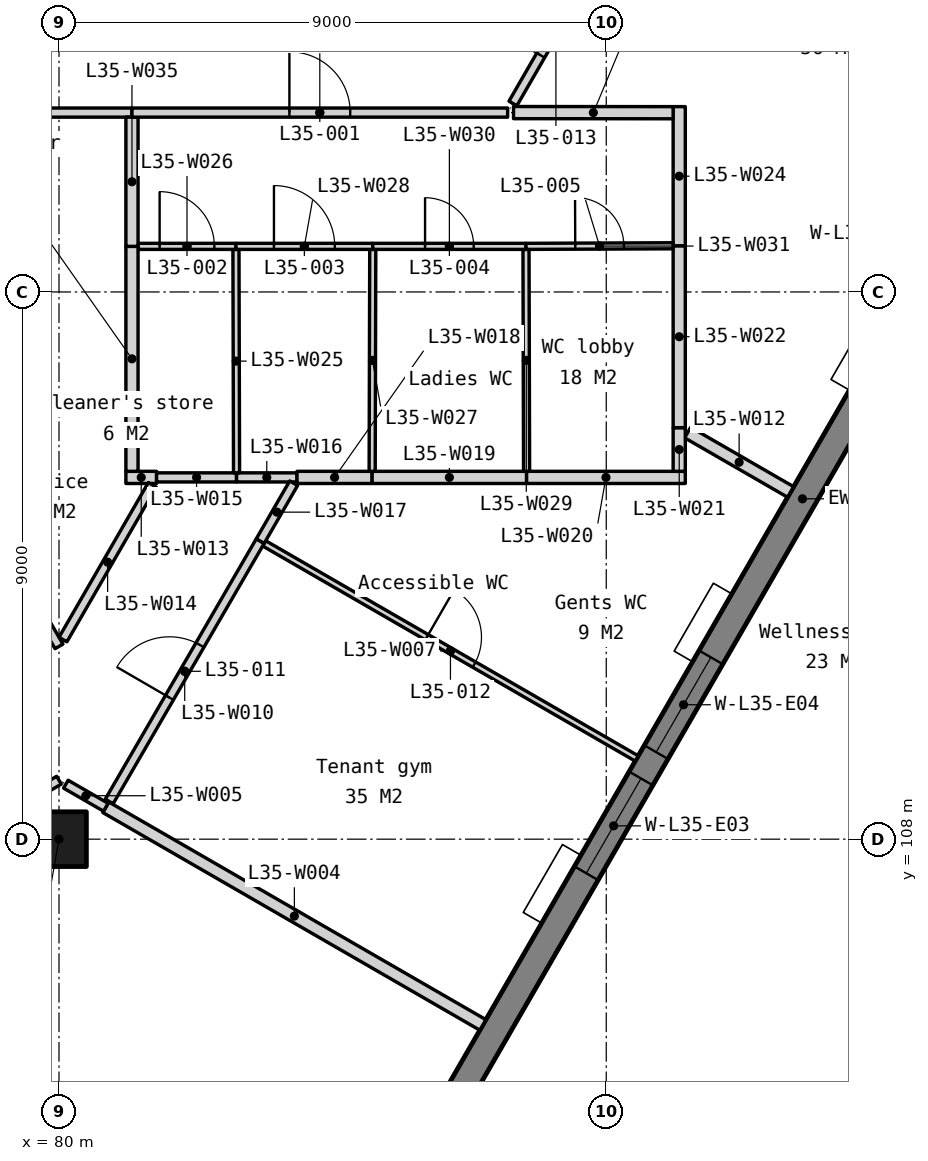
"""IFC4 building model, lengths in metres.
Left out: names, types, materials, properties, quantities, classifications, styles, units other than length and angle.
Written with IfcOpenShell. Run it as: python <this file> out.ifc"""

import sys

from ifc_helpers import new_model, si_unit, direction, frame, frame_2d, origin, origin_2d, place, context, subcontext, project, spatial, polyline, rectangle, outline, extrude, element, fill, save


model = new_model("IFC4")
c1 = context("Model", 3, precision=1e-05, world=origin(), true_north=direction((0.0, 1.0)))
c2 = subcontext(c1, "Body", "Model", "MODEL_VIEW")
j1 = project(units=[si_unit("LENGTHUNIT", "METRE"), si_unit("PLANEANGLEUNIT", "RADIAN")], contexts=[c1])
p1 = place(None, origin())
s1 = spatial("IfcSite", under=j1, at=p1, CompositionType="ELEMENT")
p2 = place(p1, origin())
s2 = spatial("IfcBuilding", under=s1, at=p2, CompositionType="ELEMENT")
p3 = place(p2, frame((0.0, 0.0, 140.3)))
s3 = spatial("IfcBuildingStorey", under=s2, at=p3, CompositionType="ELEMENT", Elevation=140.3)
p4 = place(p3, frame((80.0, 108.0, 0.0), z_axis=(0.0, 0.0, 1.0), x_axis=(1.0, 0.0, 0.0)))
e1 = element("IfcColumn", 1, at=p4, inside=s3, PredefinedType="COLUMN", context=c2, shape_type="SweptSolid", body=[
    extrude(rectangle(XDim=0.9, YDim=0.9, at=origin_2d()), origin(), (0.0, 0.0, 1.0), 3.9),
])
p5 = place(p3, frame((82.105, 96.067, -0.15), z_axis=(0.0, 0.0, 1.0), x_axis=(0.499997369791, 0.866026922331, 0.0)))
e2 = element("IfcWall", 2, at=p5, inside=s3, PredefinedType="SOLIDWALL", context=c2, shape_type="SweptSolid", body=[
    extrude(outline(polyline([(40.486, 0.0), (40.486, 3.9), (0.0, 3.9), (0.0, 0.0), (40.486, 0.0)])), frame((0.0, 0.225, 0.0), z_axis=(0.0, -1.0, 0.0), x_axis=(1.0, 0.0, 0.0)), (0.0, 0.0, 1.0), 0.45),
])
p6 = place(p5, frame((3.011, 0.0, 0.95)))
e3 = element("IfcOpeningElement", 3, at=p6, cuts=e2, PredefinedType="OPENING", context=c2, shape_type="SweptSolid", body=[
    extrude(rectangle(XDim=1.8, YDim=2.2, at=frame_2d((0.9, 1.1))), frame((0.0, 0.235, 0.0), z_axis=(0.0, -1.0, 0.0), x_axis=(1.0, 0.0, 0.0)), (0.0, 0.0, 1.0), 0.47),
])
p7 = place(p5, frame((5.311, 0.0, 0.95)))
e4 = element("IfcOpeningElement", 4, at=p7, cuts=e2, PredefinedType="OPENING", context=c2, shape_type="SweptSolid", body=[
    extrude(rectangle(XDim=1.8, YDim=2.2, at=frame_2d((0.9, 1.1))), frame((0.0, 0.235, 0.0), z_axis=(0.0, -1.0, 0.0), x_axis=(1.0, 0.0, 0.0)), (0.0, 0.0, 1.0), 0.47),
])
p8 = place(p5, frame((13.132, 0.0, 0.95)))
e5 = element("IfcOpeningElement", 5, at=p8, cuts=e2, PredefinedType="OPENING", context=c2, shape_type="SweptSolid", body=[
    extrude(rectangle(XDim=1.8, YDim=2.2, at=frame_2d((0.9, 1.1))), frame((0.0, 0.235, 0.0), z_axis=(0.0, -1.0, 0.0), x_axis=(1.0, 0.0, 0.0)), (0.0, 0.0, 1.0), 0.47),
])
p9 = place(p5, frame((15.432, 0.0, 0.95)))
e6 = element("IfcOpeningElement", 6, at=p9, cuts=e2, PredefinedType="OPENING", context=c2, shape_type="SweptSolid", body=[
    extrude(rectangle(XDim=1.8, YDim=2.2, at=frame_2d((0.9, 1.1))), frame((0.0, 0.235, 0.0), z_axis=(0.0, -1.0, 0.0), x_axis=(1.0, 0.0, 0.0)), (0.0, 0.0, 1.0), 0.47),
])
p10 = place(p5, frame((23.254, 0.0, 0.95)))
e7 = element("IfcOpeningElement", 7, at=p10, cuts=e2, PredefinedType="OPENING", context=c2, shape_type="SweptSolid", body=[
    extrude(rectangle(XDim=1.8, YDim=2.2, at=frame_2d((0.9, 1.1))), frame((0.0, 0.235, 0.0), z_axis=(0.0, -1.0, 0.0), x_axis=(1.0, 0.0, 0.0)), (0.0, 0.0, 1.0), 0.47),
])
p11 = place(p5, frame((25.554, 0.0, 0.95)))
e8 = element("IfcOpeningElement", 8, at=p11, cuts=e2, PredefinedType="OPENING", context=c2, shape_type="SweptSolid", body=[
    extrude(rectangle(XDim=1.8, YDim=2.2, at=frame_2d((0.9, 1.1))), frame((0.0, 0.235, 0.0), z_axis=(0.0, -1.0, 0.0), x_axis=(1.0, 0.0, 0.0)), (0.0, 0.0, 1.0), 0.47),
])
p12 = place(p5, frame((33.375, 0.0, 0.95)))
e9 = element("IfcOpeningElement", 9, at=p12, cuts=e2, PredefinedType="OPENING", context=c2, shape_type="SweptSolid", body=[
    extrude(rectangle(XDim=1.8, YDim=2.2, at=frame_2d((0.9, 1.1))), frame((0.0, 0.235, 0.0), z_axis=(0.0, -1.0, 0.0), x_axis=(1.0, 0.0, 0.0)), (0.0, 0.0, 1.0), 0.47),
])
p13 = place(p5, frame((35.675, 0.0, 0.95)))
e10 = element("IfcOpeningElement", 10, at=p13, cuts=e2, PredefinedType="OPENING", context=c2, shape_type="SweptSolid", body=[
    extrude(rectangle(XDim=1.8, YDim=2.2, at=frame_2d((0.9, 1.1))), frame((0.0, 0.235, 0.0), z_axis=(0.0, -1.0, 0.0), x_axis=(1.0, 0.0, 0.0)), (0.0, 0.0, 1.0), 0.47),
])
p14 = place(p3, frame((79.23, 108.525, 0.0), z_axis=(0.0, 0.0, 1.0), x_axis=(0.865970738743, 0.500094670678, 0.0)))
e11 = element("IfcWall", 11, at=p14, inside=s3, PredefinedType="PARTITIONING", context=c2, shape_type="SweptSolid", body=[
    extrude(rectangle(XDim=0.889, YDim=0.15, at=frame_2d((0.445, 0.0))), origin(), (0.0, 0.0, 1.0), 3.75),
])
p15 = place(p3, frame((80.77, 108.525, 0.0), z_axis=(0.0, 0.0, 1.0), x_axis=(0.866033408367, -0.4999861354, 0.0)))
e12 = element("IfcWall", 12, at=p15, inside=s3, PredefinedType="PARTITIONING", context=c2, shape_type="SweptSolid", body=[
    extrude(rectangle(XDim=7.16, YDim=0.2, at=frame_2d((3.58, 0.0))), origin(), (0.0, 0.0, 1.0), 3.75),
])
p16 = place(p3, frame((80.113, 108.905, 0.0), z_axis=(0.0, 0.0, 1.0), x_axis=(0.865939322839, -0.50014906694, 0.0)))
e13 = element("IfcWall", 13, at=p16, inside=s3, PredefinedType="PARTITIONING", context=c2, shape_type="SweptSolid", body=[
    extrude(rectangle(XDim=0.76, YDim=0.15, at=frame_2d((0.38, 0.0))), origin(), (0.0, 0.0, 1.0), 3.75),
])
p17 = place(p3, frame((83.374, 112.865, 0.0), z_axis=(0.0, 0.0, 1.0), x_axis=(0.866021813296, -0.500006218857, 0.0)))
e14 = element("IfcWall", 14, at=p17, inside=s3, PredefinedType="PARTITIONING", context=c2, shape_type="SweptSolid", body=[
    extrude(rectangle(XDim=7.075, YDim=0.1, at=frame_2d((3.538, 0.0))), origin(), (0.0, 0.0, 1.0), 3.75),
])
p18 = place(p17, frame((3.087, 0.0, 0.0)))
e15 = element("IfcOpeningElement", 15, at=p18, cuts=e14, PredefinedType="OPENING", context=c2, shape_type="SweptSolid", body=[
    extrude(rectangle(XDim=0.9, YDim=2.1, at=frame_2d((0.45, 1.05))), frame((0.0, 0.06, 0.0), z_axis=(0.0, -1.0, 0.0), x_axis=(1.0, 0.0, 0.0)), (0.0, 0.0, 1.0), 0.12),
])
p19 = place(p3, frame((74.931, 119.95, 0.0), z_axis=(0.0, 0.0, 1.0), x_axis=(0.499998319705, -0.866026373901, 0.0)))
e16 = element("IfcWall", 16, at=p19, inside=s3, PredefinedType="PARTITIONING", context=c2, shape_type="SweptSolid", body=[
    extrude(rectangle(XDim=10.138, YDim=0.15, at=frame_2d((5.069, 0.0))), origin(), (0.0, 0.0, 1.0), 3.75),
])
p20 = place(p19, frame((4.169, 0.0, 0.0)))
e17 = element("IfcOpeningElement", 17, at=p20, cuts=e16, PredefinedType="OPENING", context=c2, shape_type="SweptSolid", body=[
    extrude(rectangle(XDim=1.8, YDim=2.1, at=frame_2d((0.9, 1.05))), frame((0.0, 0.085, 0.0), z_axis=(0.0, -1.0, 0.0), x_axis=(1.0, 0.0, 0.0)), (0.0, 0.0, 1.0), 0.17),
])
p21 = place(p3, frame((80.825, 108.62, 0.0), z_axis=(0.0, 0.0, 1.0), x_axis=(0.501704805906, 0.865038893768, 0.0)))
e18 = element("IfcWall", 18, at=p21, inside=s3, PredefinedType="PARTITIONING", context=c2, shape_type="SweptSolid", body=[
    extrude(rectangle(XDim=4.951, YDim=0.15, at=frame_2d((2.476, 0.0))), origin(), (0.0, 0.0, 1.0), 3.75),
])
p22 = place(p21, frame((1.975, 0.0, 0.0)))
e19 = element("IfcOpeningElement", 19, at=p22, cuts=e18, PredefinedType="OPENING", context=c2, shape_type="SweptSolid", body=[
    extrude(rectangle(XDim=1.0, YDim=2.1, at=frame_2d((0.5, 1.05))), frame((0.0, 0.085, 0.0), z_axis=(0.0, -1.0, 0.0), x_axis=(1.0, 0.0, 0.0)), (0.0, 0.0, 1.0), 0.17),
])
p23 = place(p3, frame((90.339, 114.688, 0.0), z_axis=(0.0, 0.0, 1.0), x_axis=(0.866021300503, -0.500007107024, 0.0)))
e20 = element("IfcWall", 20, at=p23, inside=s3, PredefinedType="PARTITIONING", context=c2, shape_type="SweptSolid", body=[
    extrude(rectangle(XDim=1.955, YDim=0.2, at=frame_2d((0.978, 0.0))), origin(), (0.0, 0.0, 1.0), 3.75),
])
p24 = place(p3, frame((81.1, 113.95, 0.0), z_axis=(0.0, 0.0, 1.0), x_axis=(1.0, 0.0, 0.0)))
e21 = element("IfcWall", 21, at=p24, inside=s3, PredefinedType="PARTITIONING", context=c2, shape_type="SweptSolid", body=[
    extrude(rectangle(XDim=0.505, YDim=0.2, at=frame_2d((0.252, 0.0))), origin(), (0.0, 0.0, 1.0), 3.75),
])
p25 = place(p3, frame((80.065, 111.283, 0.0), z_axis=(0.0, 0.0, 1.0), x_axis=(0.499962090823, 0.866047289552, 0.0)))
e22 = element("IfcWall", 22, at=p25, inside=s3, PredefinedType="PARTITIONING", context=c2, shape_type="SweptSolid", body=[
    extrude(rectangle(XDim=2.94, YDim=0.15, at=frame_2d((1.47, 0.0))), origin(), (0.0, 0.0, 1.0), 3.75),
])
p26 = place(p3, frame((81.605, 113.95, 0.0), z_axis=(0.0, 0.0, 1.0), x_axis=(1.0, 0.0, 0.0)))
e23 = element("IfcWall", 23, at=p26, inside=s3, PredefinedType="PARTITIONING", context=c2, shape_type="SweptSolid", body=[
    extrude(rectangle(XDim=1.315, YDim=0.15, at=frame_2d((0.658, 0.0))), origin(), (0.0, 0.0, 1.0), 3.75),
])
p27 = place(p3, frame((82.92, 113.95, 0.0), z_axis=(0.0, 0.0, 1.0), x_axis=(1.0, 0.0, 0.0)))
e24 = element("IfcWall", 24, at=p27, inside=s3, PredefinedType="PARTITIONING", context=c2, shape_type="SweptSolid", body=[
    extrude(rectangle(XDim=0.994, YDim=0.15, at=frame_2d((0.497, 0.0))), origin(), (0.0, 0.0, 1.0), 3.75),
])
p28 = place(p3, frame((83.309, 112.903, 0.0), z_axis=(0.0, 0.0, 1.0), x_axis=(0.500055614084, 0.865993292597, 0.0)))
e25 = element("IfcWall", 25, at=p28, inside=s3, PredefinedType="PARTITIONING", context=c2, shape_type="SweptSolid", body=[
    extrude(rectangle(XDim=1.099, YDim=0.15, at=frame_2d((0.55, 0.0))), origin(), (0.0, 0.0, 1.0), 3.75),
])
p29 = place(p3, frame((83.914, 113.95, 0.0), z_axis=(0.0, 0.0, 1.0), x_axis=(1.0, 0.0, 0.0)))
e26 = element("IfcWall", 26, at=p29, inside=s3, PredefinedType="PARTITIONING", context=c2, shape_type="SweptSolid", body=[
    extrude(rectangle(XDim=1.236, YDim=0.2, at=frame_2d((0.618, 0.0))), origin(), (0.0, 0.0, 1.0), 3.75),
])
p30 = place(p3, frame((85.15, 113.95, 0.0), z_axis=(0.0, 0.0, 1.0), x_axis=(1.0, 0.0, 0.0)))
e27 = element("IfcWall", 27, at=p30, inside=s3, PredefinedType="PARTITIONING", context=c2, shape_type="SweptSolid", body=[
    extrude(rectangle(XDim=2.54, YDim=0.2, at=frame_2d((1.27, 0.0))), origin(), (0.0, 0.0, 1.0), 3.75),
])
p31 = place(p3, frame((87.69, 113.95, 0.0), z_axis=(0.0, 0.0, 1.0), x_axis=(1.0, 0.0, 0.0)))
e28 = element("IfcWall", 28, at=p31, inside=s3, PredefinedType="PARTITIONING", context=c2, shape_type="SweptSolid", body=[
    extrude(rectangle(XDim=2.61, YDim=0.2, at=frame_2d((1.305, 0.0))), origin(), (0.0, 0.0, 1.0), 3.75),
])
p32 = place(p3, frame((90.2, 114.05, 0.0), z_axis=(0.0, 0.0, 1.0), x_axis=(0.0, 1.0, 0.0)))
e29 = element("IfcWall", 29, at=p32, inside=s3, PredefinedType="PARTITIONING", context=c2, shape_type="SweptSolid", body=[
    extrude(rectangle(XDim=0.718, YDim=0.2, at=frame_2d((0.359, 0.0))), origin(), (0.0, 0.0, 1.0), 3.75),
])
p33 = place(p3, frame((90.2, 114.768, 0.0), z_axis=(0.0, 0.0, 1.0), x_axis=(0.0, 1.0, 0.0)))
e30 = element("IfcWall", 30, at=p33, inside=s3, PredefinedType="PARTITIONING", context=c2, shape_type="SweptSolid", body=[
    extrude(rectangle(XDim=2.992, YDim=0.2, at=frame_2d((1.496, 0.0))), origin(), (0.0, 0.0, 1.0), 3.75),
])
p34 = place(p3, frame((90.2, 117.76, 0.0), z_axis=(0.0, 0.0, 1.0), x_axis=(0.0, 1.0, 0.0)))
e31 = element("IfcWall", 31, at=p34, inside=s3, PredefinedType="PARTITIONING", context=c2, shape_type="SweptSolid", body=[
    extrude(rectangle(XDim=2.288, YDim=0.2, at=frame_2d((1.144, 0.0))), origin(), (0.0, 0.0, 1.0), 3.75),
])
p35 = place(p3, frame((82.92, 114.025, 0.0), z_axis=(0.0, 0.0, 1.0), x_axis=(-0.002657268237, 0.999996469457, 0.0)))
e32 = element("IfcWall", 32, at=p35, inside=s3, PredefinedType="PARTITIONING", context=c2, shape_type="SweptSolid", body=[
    extrude(rectangle(XDim=3.675, YDim=0.1, at=frame_2d((1.837, 0.0))), origin(), (0.0, 0.0, 1.0), 3.75),
])
p36 = place(p3, frame((81.3, 117.75, 0.0), z_axis=(0.0, 0.0, 1.0), x_axis=(1.0, 0.0, 0.0)))
e33 = element("IfcWall", 33, at=p36, inside=s3, PredefinedType="PARTITIONING", context=c2, shape_type="SweptSolid", body=[
    extrude(rectangle(XDim=1.61, YDim=0.1, at=frame_2d((0.805, 0.0))), origin(), (0.0, 0.0, 1.0), 3.75),
])
p37 = place(p36, frame((0.355, 0.0, 0.0)))
e34 = element("IfcOpeningElement", 34, at=p37, cuts=e33, PredefinedType="OPENING", context=c2, shape_type="SweptSolid", body=[
    extrude(rectangle(XDim=0.9, YDim=2.1, at=frame_2d((0.45, 1.05))), frame((0.0, 0.06, 0.0), z_axis=(0.0, -1.0, 0.0), x_axis=(1.0, 0.0, 0.0)), (0.0, 0.0, 1.0), 0.12),
])
p38 = place(p3, frame((85.15, 114.05, 0.0), z_axis=(0.0, 0.0, 1.0), x_axis=(0.002675575707, 0.999996420641, 0.0)))
e35 = element("IfcWall", 35, at=p38, inside=s3, PredefinedType="PARTITIONING", context=c2, shape_type="SweptSolid", body=[
    extrude(rectangle(XDim=3.65, YDim=0.1, at=frame_2d((1.825, 0.0))), origin(), (0.0, 0.0, 1.0), 3.75),
])
p39 = place(p3, frame((82.91, 117.75, 0.0), z_axis=(0.0, 0.0, 1.0), x_axis=(1.0, 0.0, 0.0)))
e36 = element("IfcWall", 36, at=p39, inside=s3, PredefinedType="PARTITIONING", context=c2, shape_type="SweptSolid", body=[
    extrude(rectangle(XDim=2.25, YDim=0.1, at=frame_2d((1.125, 0.0))), origin(), (0.0, 0.0, 1.0), 3.75),
])
p40 = place(p39, frame((0.625, 0.0, 0.0)))
e37 = element("IfcOpeningElement", 37, at=p40, cuts=e36, PredefinedType="OPENING", context=c2, shape_type="SweptSolid", body=[
    extrude(rectangle(XDim=1.0, YDim=2.1, at=frame_2d((0.5, 1.05))), frame((0.0, 0.06, 0.0), z_axis=(0.0, -1.0, 0.0), x_axis=(1.0, 0.0, 0.0)), (0.0, 0.0, 1.0), 0.12),
])
p41 = place(p3, frame((87.69, 114.05, 0.0), z_axis=(0.0, 0.0, 1.0), x_axis=(-0.002608686776, 0.999996597371, 0.0)))
e38 = element("IfcWall", 38, at=p41, inside=s3, PredefinedType="PARTITIONING", context=c2, shape_type="SweptSolid", body=[
    extrude(rectangle(XDim=3.65, YDim=0.1, at=frame_2d((1.825, 0.0))), origin(), (0.0, 0.0, 1.0), 3.75),
])
p42 = place(p3, frame((85.16, 117.75, 0.0), z_axis=(0.0, 0.0, 1.0), x_axis=(1.0, 0.0, 0.0)))
e39 = element("IfcWall", 39, at=p42, inside=s3, PredefinedType="PARTITIONING", context=c2, shape_type="SweptSolid", body=[
    extrude(rectangle(XDim=2.52, YDim=0.1, at=frame_2d((1.26, 0.0))), origin(), (0.0, 0.0, 1.0), 3.75),
])
p43 = place(p42, frame((0.86, 0.0, 0.0)))
e40 = element("IfcOpeningElement", 40, at=p43, cuts=e39, PredefinedType="OPENING", context=c2, shape_type="SweptSolid", body=[
    extrude(rectangle(XDim=0.8, YDim=2.1, at=frame_2d((0.4, 1.05))), frame((0.0, 0.06, 0.0), z_axis=(0.0, -1.0, 0.0), x_axis=(1.0, 0.0, 0.0)), (0.0, 0.0, 1.0), 0.12),
])
p44 = place(p3, frame((87.68, 117.75, 0.0), z_axis=(0.0, 0.0, 1.0), x_axis=(0.999992261016, 0.003934197335, 0.0)))
e41 = element("IfcWall", 41, at=p44, inside=s3, PredefinedType="PARTITIONING", context=c2, shape_type="SweptSolid", body=[
    extrude(rectangle(XDim=2.42, YDim=0.1, at=frame_2d((1.21, 0.0))), origin(), (0.0, 0.0, 1.0), 3.75),
])
p45 = place(p44, frame((0.81, 0.0, 0.0)))
e42 = element("IfcOpeningElement", 42, at=p45, cuts=e41, PredefinedType="OPENING", context=c2, shape_type="SweptSolid", body=[
    extrude(rectangle(XDim=0.8, YDim=2.1, at=frame_2d((0.4, 1.05))), frame((0.0, 0.06, 0.0), z_axis=(0.0, -1.0, 0.0), x_axis=(1.0, 0.0, 0.0)), (0.0, 0.0, 1.0), 0.12),
])
p46 = place(p3, frame((81.2, 114.05, 0.0), z_axis=(0.0, 0.0, 1.0), x_axis=(0.0, 1.0, 0.0)))
e43 = element("IfcWall", 43, at=p46, inside=s3, PredefinedType="PARTITIONING", context=c2, shape_type="SweptSolid", body=[
    extrude(rectangle(XDim=3.7, YDim=0.2, at=frame_2d((1.85, 0.0))), origin(), (0.0, 0.0, 1.0), 3.75),
])
p47 = place(p3, frame((75.061, 119.95, 0.0), z_axis=(0.0, 0.0, 1.0), x_axis=(1.0, 0.0, 0.0)))
e44 = element("IfcWall", 44, at=p47, inside=s3, PredefinedType="PARTITIONING", context=c2, shape_type="SweptSolid", body=[
    extrude(rectangle(XDim=6.139, YDim=0.15, at=frame_2d((3.069, 0.0))), origin(), (0.0, 0.0, 1.0), 3.75),
])
p48 = place(p3, frame((81.2, 117.75, 0.0), z_axis=(0.0, 0.0, 1.0), x_axis=(0.0, 1.0, 0.0)))
e45 = element("IfcWall", 45, at=p48, inside=s3, PredefinedType="PARTITIONING", context=c2, shape_type="SweptSolid", body=[
    extrude(rectangle(XDim=2.125, YDim=0.2, at=frame_2d((1.062, 0.0))), origin(), (0.0, 0.0, 1.0), 3.75),
])
p49 = place(p3, frame((81.2, 119.95, 0.0), z_axis=(0.0, 0.0, 1.0), x_axis=(1.0, 0.0, 0.0)))
e46 = element("IfcWall", 46, at=p49, inside=s3, PredefinedType="PARTITIONING", context=c2, shape_type="SweptSolid", body=[
    extrude(rectangle(XDim=6.178, YDim=0.15, at=frame_2d((3.089, 0.0))), origin(), (0.0, 0.0, 1.0), 3.75),
])
p50 = place(p49, frame((2.589, 0.0, 0.0)))
e47 = element("IfcOpeningElement", 47, at=p50, cuts=e46, PredefinedType="OPENING", context=c2, shape_type="SweptSolid", body=[
    extrude(rectangle(XDim=1.0, YDim=2.1, at=frame_2d((0.5, 1.05))), frame((0.0, 0.085, 0.0), z_axis=(0.0, -1.0, 0.0), x_axis=(1.0, 0.0, 0.0)), (0.0, 0.0, 1.0), 0.17),
])
p51 = place(p3, frame((87.475, 119.95, 0.0), z_axis=(0.0, 0.0, 1.0), x_axis=(0.999999723197, -0.000744047413, 0.0)))
e48 = element("IfcWall", 48, at=p51, inside=s3, PredefinedType="PARTITIONING", context=c2, shape_type="SweptSolid", body=[
    extrude(rectangle(XDim=2.625, YDim=0.2, at=frame_2d((1.312, 0.0))), origin(), (0.0, 0.0, 1.0), 3.75),
])
p52 = place(p3, frame((87.465, 120.1, 0.0), z_axis=(0.0, 0.0, 1.0), x_axis=(0.499991416419, 0.86603035946, 0.0)))
e49 = element("IfcWall", 49, at=p52, inside=s3, PredefinedType="PARTITIONING", context=c2, shape_type="SweptSolid", body=[
    extrude(rectangle(XDim=2.829, YDim=0.15, at=frame_2d((1.414, 0.0))), origin(), (0.0, 0.0, 1.0), 3.75),
])
p53 = place(p52, frame((0.914, 0.0, 0.0)))
e50 = element("IfcOpeningElement", 50, at=p53, cuts=e49, PredefinedType="OPENING", context=c2, shape_type="SweptSolid", body=[
    extrude(rectangle(XDim=1.0, YDim=2.1, at=frame_2d((0.5, 1.05))), frame((0.0, 0.085, 0.0), z_axis=(0.0, -1.0, 0.0), x_axis=(1.0, 0.0, 0.0)), (0.0, 0.0, 1.0), 0.17),
])
p54 = place(p8, origin())
e51 = element("IfcWindow", 51, at=p54, inside=s3, PartitioningType="SINGLE_PANEL", PredefinedType="WINDOW", context=c2, shape_type="SweptSolid", body=[
    extrude(rectangle(XDim=1.8, YDim=2.2, at=frame_2d((0.9, 1.1))), frame((0.0, 0.03, 0.0), z_axis=(0.0, -1.0, 0.0), x_axis=(1.0, 0.0, 0.0)), (0.0, 0.0, 1.0), 0.06),
])
fill(e5, e51)
p55 = place(p9, origin())
e52 = element("IfcWindow", 52, at=p55, inside=s3, PartitioningType="SINGLE_PANEL", PredefinedType="WINDOW", context=c2, shape_type="SweptSolid", body=[
    extrude(rectangle(XDim=1.8, YDim=2.2, at=frame_2d((0.9, 1.1))), frame((0.0, 0.03, 0.0), z_axis=(0.0, -1.0, 0.0), x_axis=(1.0, 0.0, 0.0)), (0.0, 0.0, 1.0), 0.06),
])
fill(e6, e52)
p56 = place(p50, origin())
e53 = element("IfcDoor", 53, at=p56, inside=s3, OperationType="SINGLE_SWING_LEFT", PredefinedType="DOOR", context=c2, shape_type="SweptSolid", body=[
    extrude(rectangle(XDim=1.0, YDim=2.1, at=frame_2d((0.5, 1.05))), frame((0.0, 0.025, 0.0), z_axis=(0.0, -1.0, 0.0), x_axis=(1.0, 0.0, 0.0)), (0.0, 0.0, 1.0), 0.05),
])
fill(e47, e53)
p57 = place(p37, origin())
e54 = element("IfcDoor", 54, at=p57, inside=s3, OperationType="SINGLE_SWING_LEFT", PredefinedType="DOOR", context=c2, shape_type="SweptSolid", body=[
    extrude(rectangle(XDim=0.9, YDim=2.1, at=frame_2d((0.45, 1.05))), frame((0.0, 0.025, 0.0), z_axis=(0.0, -1.0, 0.0), x_axis=(1.0, 0.0, 0.0)), (0.0, 0.0, 1.0), 0.05),
])
fill(e34, e54)
p58 = place(p40, origin())
e55 = element("IfcDoor", 55, at=p58, inside=s3, OperationType="SINGLE_SWING_LEFT", PredefinedType="DOOR", context=c2, shape_type="SweptSolid", body=[
    extrude(rectangle(XDim=1.0, YDim=2.1, at=frame_2d((0.5, 1.05))), frame((0.0, 0.025, 0.0), z_axis=(0.0, -1.0, 0.0), x_axis=(1.0, 0.0, 0.0)), (0.0, 0.0, 1.0), 0.05),
])
fill(e37, e55)
p59 = place(p43, origin())
e56 = element("IfcDoor", 56, at=p59, inside=s3, OperationType="SINGLE_SWING_LEFT", PredefinedType="DOOR", context=c2, shape_type="SweptSolid", body=[
    extrude(rectangle(XDim=0.8, YDim=2.1, at=frame_2d((0.4, 1.05))), frame((0.0, 0.025, 0.0), z_axis=(0.0, -1.0, 0.0), x_axis=(1.0, 0.0, 0.0)), (0.0, 0.0, 1.0), 0.05),
])
fill(e40, e56)
p60 = place(p45, origin())
e57 = element("IfcDoor", 57, at=p60, inside=s3, OperationType="SINGLE_SWING_LEFT", PredefinedType="DOOR", context=c2, shape_type="SweptSolid", body=[
    extrude(rectangle(XDim=0.8, YDim=2.1, at=frame_2d((0.4, 1.05))), frame((0.0, 0.025, 0.0), z_axis=(0.0, -1.0, 0.0), x_axis=(1.0, 0.0, 0.0)), (0.0, 0.0, 1.0), 0.05),
])
fill(e42, e57)
p61 = place(p22, origin())
e58 = element("IfcDoor", 58, at=p61, inside=s3, OperationType="SINGLE_SWING_LEFT", PredefinedType="DOOR", context=c2, shape_type="SweptSolid", body=[
    extrude(rectangle(XDim=1.0, YDim=2.1, at=frame_2d((0.5, 1.05))), frame((0.0, 0.025, 0.0), z_axis=(0.0, -1.0, 0.0), x_axis=(1.0, 0.0, 0.0)), (0.0, 0.0, 1.0), 0.05),
])
fill(e19, e58)
p62 = place(p18, origin())
e59 = element("IfcDoor", 59, at=p62, inside=s3, OperationType="SINGLE_SWING_LEFT", PredefinedType="DOOR", context=c2, shape_type="SweptSolid", body=[
    extrude(rectangle(XDim=0.9, YDim=2.1, at=frame_2d((0.45, 1.05))), frame((0.0, 0.025, 0.0), z_axis=(0.0, -1.0, 0.0), x_axis=(1.0, 0.0, 0.0)), (0.0, 0.0, 1.0), 0.05),
])
fill(e15, e59)
p63 = place(p53, origin())
e60 = element("IfcDoor", 60, at=p63, inside=s3, OperationType="SINGLE_SWING_LEFT", PredefinedType="DOOR", context=c2, shape_type="SweptSolid", body=[
    extrude(rectangle(XDim=1.0, YDim=2.1, at=frame_2d((0.5, 1.05))), frame((0.0, 0.025, 0.0), z_axis=(0.0, -1.0, 0.0), x_axis=(1.0, 0.0, 0.0)), (0.0, 0.0, 1.0), 0.05),
])
fill(e50, e60)
save(model, sys.argv[1])
